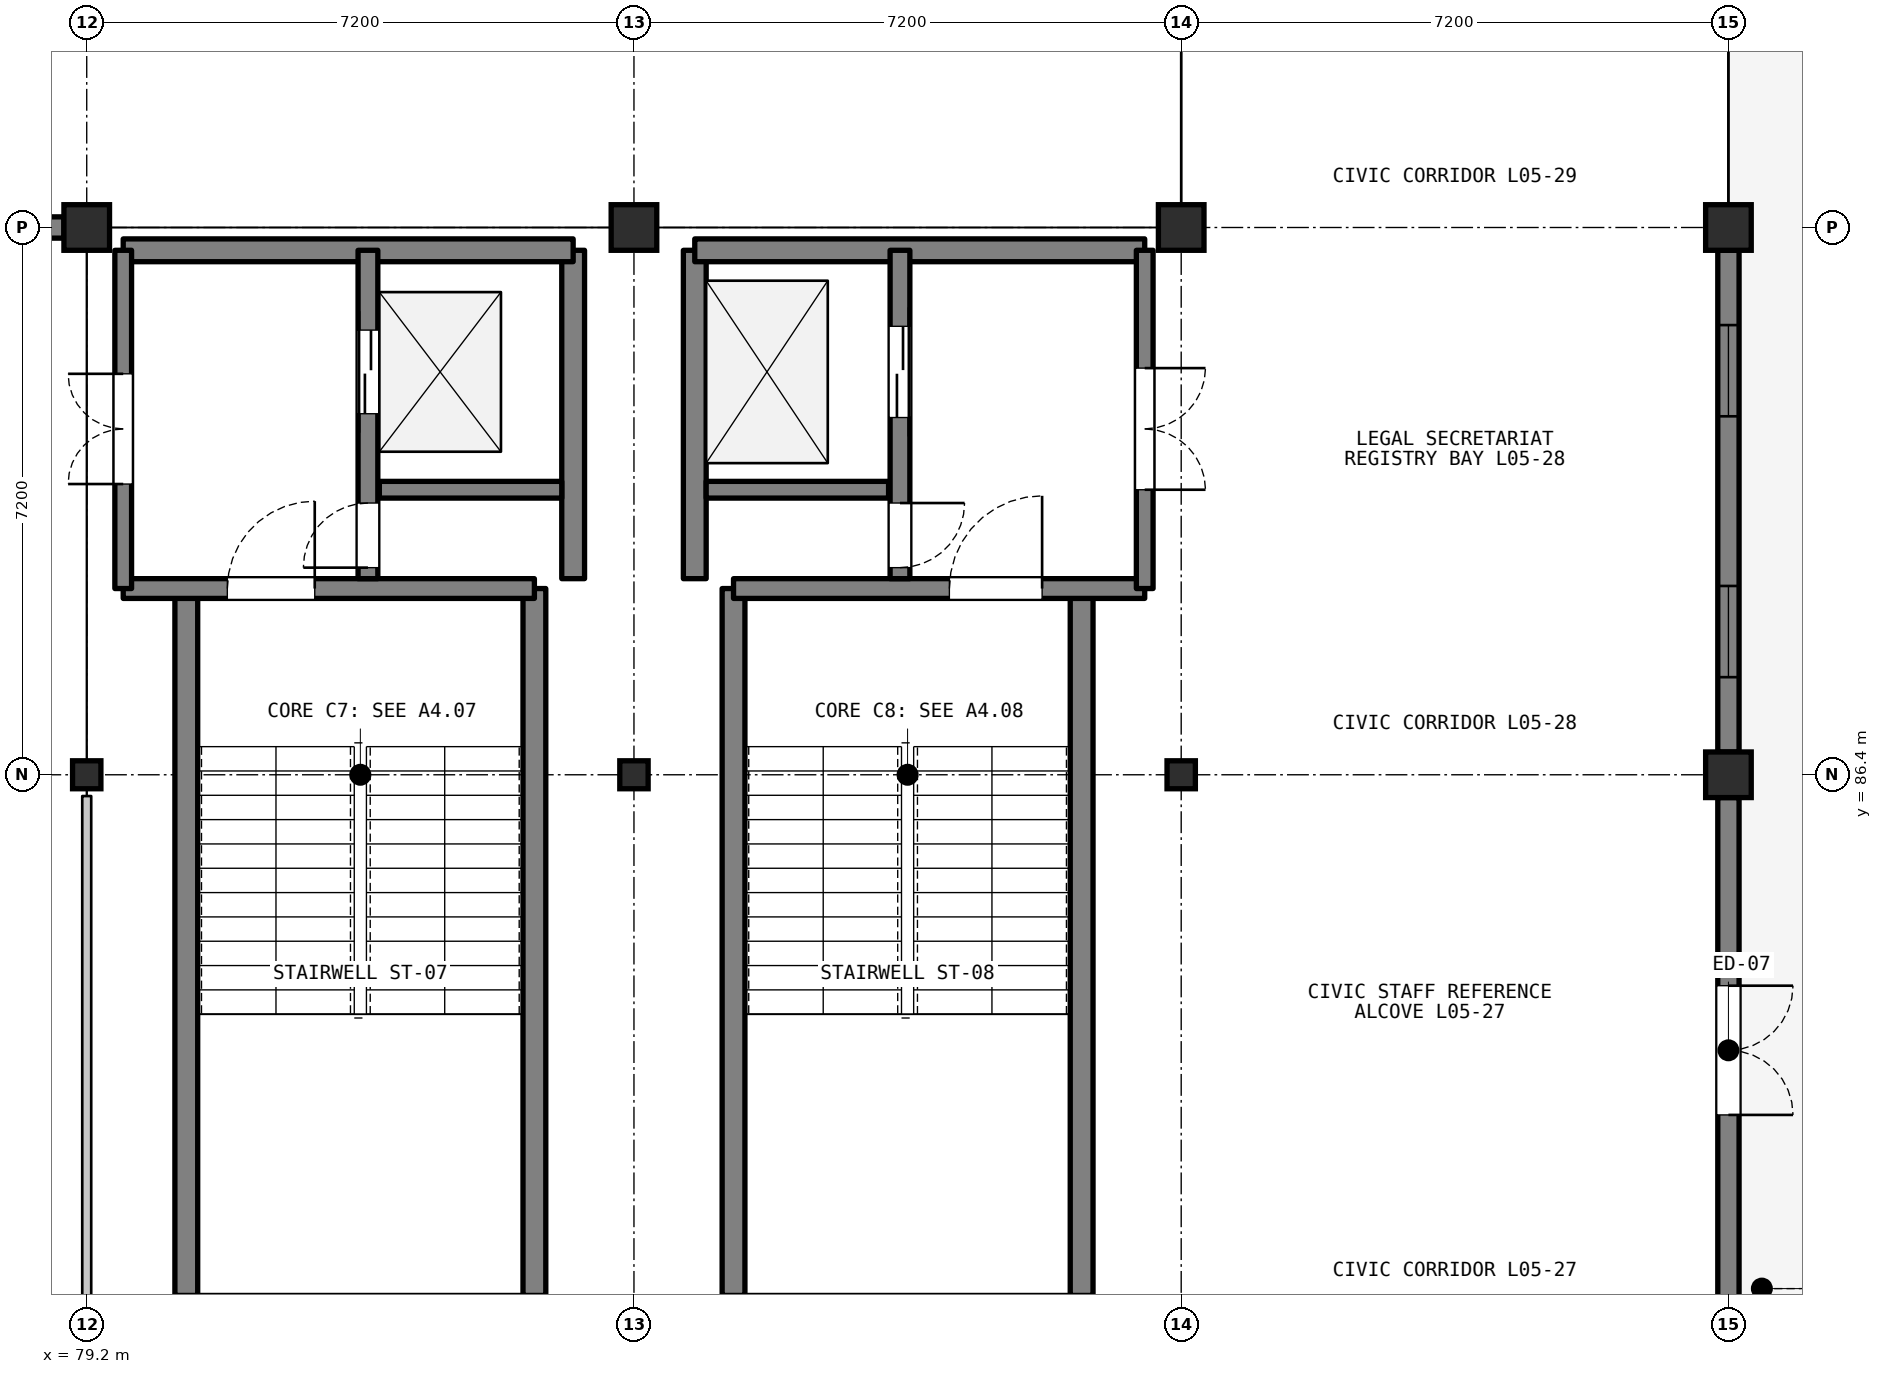
"""IFC4 building model, lengths in metres.
Left out: names, types, materials, properties, quantities, classifications, styles, units other than length and angle.
Written with IfcOpenShell. Run it as: python <this file> out.ifc"""

import sys

from ifc_helpers import new_model, si_unit, direction, frame, frame_2d, origin, origin_2d, place, context, subcontext, project, spatial, rectangle, i_section, extrude, element, fill, save


model = new_model("IFC4")
c1 = context("Model", 3, precision=1e-05, world=origin(), true_north=direction((0.0, 1.0)))
c2 = subcontext(c1, "Body", "Model", "MODEL_VIEW")
j1 = project(units=[si_unit("LENGTHUNIT", "METRE"), si_unit("PLANEANGLEUNIT", "RADIAN")], contexts=[c1])
p1 = place(None, origin())
s1 = spatial("IfcSite", under=j1, at=p1, CompositionType="ELEMENT")
p2 = place(p1, origin())
s2 = spatial("IfcBuilding", under=s1, at=p2, CompositionType="ELEMENT")
p3 = place(p2, frame((0.0, 0.0, 18.0)))
s3 = spatial("IfcBuildingStorey", under=s2, at=p3, CompositionType="ELEMENT", Elevation=18.0)
p4 = place(p3, frame((79.2, 86.4, 0.0), z_axis=(0.0, 0.0, 1.0), x_axis=(1.0, 0.0, 0.0)))
e1 = element("IfcColumn", 1, at=p4, inside=s3, PredefinedType="COLUMN", context=c2, shape_type="SweptSolid", body=[
    extrude(i_section(OverallWidth=0.373, OverallDepth=0.368, WebThickness=0.015, FlangeThickness=0.024, FilletRadius=0.015, at=origin_2d()), origin(), (0.0, 0.0, 1.0), 3.9),
])
p5 = place(p3, frame((79.2, 93.6, 0.0), z_axis=(0.0, 0.0, 1.0), x_axis=(1.0, 0.0, 0.0)))
e2 = element("IfcColumn", 2, at=p5, inside=s3, PredefinedType="COLUMN", context=c2, shape_type="SweptSolid", body=[
    extrude(rectangle(XDim=0.6, YDim=0.6, at=origin_2d()), origin(), (0.0, 0.0, 1.0), 3.9),
])
p6 = place(p3, frame((86.4, 86.4, 0.0), z_axis=(0.0, 0.0, 1.0), x_axis=(1.0, 0.0, 0.0)))
e3 = element("IfcColumn", 3, at=p6, inside=s3, PredefinedType="COLUMN", context=c2, shape_type="SweptSolid", body=[
    extrude(i_section(OverallWidth=0.373, OverallDepth=0.368, WebThickness=0.015, FlangeThickness=0.024, FilletRadius=0.015, at=origin_2d()), origin(), (0.0, 0.0, 1.0), 3.9),
])
p7 = place(p3, frame((86.4, 93.6, 0.0), z_axis=(0.0, 0.0, 1.0), x_axis=(1.0, 0.0, 0.0)))
e4 = element("IfcColumn", 4, at=p7, inside=s3, PredefinedType="COLUMN", context=c2, shape_type="SweptSolid", body=[
    extrude(rectangle(XDim=0.6, YDim=0.6, at=origin_2d()), origin(), (0.0, 0.0, 1.0), 3.9),
])
p8 = place(p3, frame((93.6, 86.4, 0.0), z_axis=(0.0, 0.0, 1.0), x_axis=(1.0, 0.0, 0.0)))
e5 = element("IfcColumn", 5, at=p8, inside=s3, PredefinedType="COLUMN", context=c2, shape_type="SweptSolid", body=[
    extrude(i_section(OverallWidth=0.373, OverallDepth=0.368, WebThickness=0.015, FlangeThickness=0.024, FilletRadius=0.015, at=origin_2d()), origin(), (0.0, 0.0, 1.0), 3.9),
])
for number, where, z_axis, x_axis in (
    (6, (93.6, 93.6, 0.0), (0.0, 0.0, 1.0), (1.0, 0.0, 0.0)),
    (7, (100.8, 86.4, 0.0), (0.0, 0.0, 1.0), (1.0, 0.0, 0.0)),
    (8, (100.8, 93.6, 0.0), (0.0, 0.0, 1.0), (1.0, 0.0, 0.0)),
):
    element("IfcColumn", number, at=place(p3, frame(where, z_axis=z_axis, x_axis=x_axis)), inside=s3, PredefinedType="COLUMN", context=c2, shape_type="SweptSolid", body=[
        extrude(rectangle(XDim=0.6, YDim=0.6, at=origin_2d()), origin(), (0.0, 0.0, 1.0), 3.9),
    ])
p9 = place(p3, frame((72.3, 93.6, 0.0), z_axis=(0.0, 0.0, 1.0), x_axis=(1.0, 0.0, 0.0)))
e9 = element("IfcWall", 9, at=p9, inside=s3, PredefinedType="SOLIDWALL", context=c2, shape_type="SweptSolid", body=[
    extrude(rectangle(XDim=6.6, YDim=0.28, at=frame_2d((3.3, 0.0))), origin(), (0.0, 0.0, 1.0), 3.192),
])
p10 = place(p3, frame((100.8, 86.1, 0.0), z_axis=(0.0, 0.0, 1.0), x_axis=(0.0, -1.0, 0.0)))
e10 = element("IfcWall", 10, at=p10, inside=s3, PredefinedType="SOLIDWALL", context=c2, shape_type="SweptSolid", body=[
    extrude(rectangle(XDim=6.65, YDim=0.28, at=frame_2d((3.325, 0.0))), origin(), (0.0, 0.0, 1.0), 3.172),
])
p11 = place(p10, frame((2.475, 0.0, 0.0)))
e11 = element("IfcOpeningElement", 11, at=p11, cuts=e10, PredefinedType="OPENING", context=c2, shape_type="SweptSolid", body=[
    extrude(rectangle(XDim=1.7, YDim=2.25, at=frame_2d((0.85, 1.125))), frame((0.0, 0.15, 0.0), z_axis=(0.0, -1.0, 0.0), x_axis=(1.0, 0.0, 0.0)), (0.0, 0.0, 1.0), 0.3),
])
p12 = place(p3, frame((100.8, 93.3, 0.0), z_axis=(0.0, 0.0, 1.0), x_axis=(0.0, -1.0, 0.0)))
e12 = element("IfcWall", 12, at=p12, inside=s3, PredefinedType="SOLIDWALL", context=c2, shape_type="SweptSolid", body=[
    extrude(rectangle(XDim=6.6, YDim=0.28, at=frame_2d((3.3, 0.0))), origin(), (0.0, 0.0, 1.0), 3.192),
])
p13 = place(p12, frame((0.984, 0.0, 0.95)))
e13 = element("IfcOpeningElement", 13, at=p13, cuts=e12, PredefinedType="OPENING", context=c2, shape_type="SweptSolid", body=[
    extrude(rectangle(XDim=1.2, YDim=1.7, at=frame_2d((0.6, 0.85))), frame((0.0, 0.15, 0.0), z_axis=(0.0, -1.0, 0.0), x_axis=(1.0, 0.0, 0.0)), (0.0, 0.0, 1.0), 0.3),
])
p14 = place(p12, frame((4.416, 0.0, 0.95)))
e14 = element("IfcOpeningElement", 14, at=p14, cuts=e12, PredefinedType="OPENING", context=c2, shape_type="SweptSolid", body=[
    extrude(rectangle(XDim=1.2, YDim=1.7, at=frame_2d((0.6, 0.85))), frame((0.0, 0.15, 0.0), z_axis=(0.0, -1.0, 0.0), x_axis=(1.0, 0.0, 0.0)), (0.0, 0.0, 1.0), 0.3),
])
for number, where, z_axis, x_axis in (
    (15, (80.51, 79.55, 0.0), (0.0, 0.0, 1.0), (0.0, 1.0, 0.0)),
    (16, (85.09, 79.55, 0.0), (0.0, 0.0, 1.0), (0.0, 1.0, 0.0)),
):
    element("IfcWall", number, at=place(p3, frame(where, z_axis=z_axis, x_axis=x_axis)), inside=s3, PredefinedType="SHEAR", context=c2, shape_type="SweptSolid", body=[
        extrude(rectangle(XDim=9.3, YDim=0.3, at=frame_2d((4.65, 0.0))), origin(), (0.0, 0.0, 1.0), 3.72),
    ])
p15 = place(p3, frame((79.68, 88.85, 0.0), z_axis=(0.0, 0.0, 1.0), x_axis=(1.0, 0.0, 0.0)))
e17 = element("IfcWall", 17, at=p15, inside=s3, PredefinedType="SHEAR", context=c2, shape_type="SweptSolid", body=[
    extrude(rectangle(XDim=5.41, YDim=0.26, at=frame_2d((2.705, 0.0))), origin(), (0.0, 0.0, 1.0), 3.72),
])
p16 = place(p15, frame((1.37, 0.0, 0.0)))
e18 = element("IfcOpeningElement", 18, at=p16, cuts=e17, PredefinedType="OPENING", context=c2, shape_type="SweptSolid", body=[
    extrude(rectangle(XDim=1.15, YDim=2.15, at=frame_2d((0.575, 1.075))), frame((0.0, 0.14, 0.0), z_axis=(0.0, -1.0, 0.0), x_axis=(1.0, 0.0, 0.0)), (0.0, 0.0, 1.0), 0.28),
])
p17 = place(p3, frame((85.6, 88.98, 0.0), z_axis=(0.0, 0.0, 1.0), x_axis=(0.0, 1.0, 0.0)))
e19 = element("IfcWall", 19, at=p17, inside=s3, PredefinedType="SHEAR", context=c2, shape_type="SweptSolid", body=[
    extrude(rectangle(XDim=4.32, YDim=0.3, at=frame_2d((2.16, 0.0))), origin(), (0.0, 0.0, 1.0), 3.72),
])
p18 = place(p3, frame((79.68, 93.3, 0.0), z_axis=(0.0, 0.0, 1.0), x_axis=(1.0, 0.0, 0.0)))
e20 = element("IfcWall", 20, at=p18, inside=s3, PredefinedType="SHEAR", context=c2, shape_type="SweptSolid", body=[
    extrude(rectangle(XDim=5.92, YDim=0.3, at=frame_2d((2.96, 0.0))), origin(), (0.0, 0.0, 1.0), 3.72),
])
p19 = place(p3, frame((83.05, 90.15, 0.0), z_axis=(0.0, 0.0, 1.0), x_axis=(1.0, 0.0, 0.0)))
e21 = element("IfcWall", 21, at=p19, inside=s3, PredefinedType="SHEAR", context=c2, shape_type="SweptSolid", body=[
    extrude(rectangle(XDim=2.4, YDim=0.22, at=frame_2d((1.2, 0.0))), origin(), (0.0, 0.0, 1.0), 3.72),
])
p20 = place(p3, frame((82.9, 88.98, 0.0), z_axis=(0.0, 0.0, 1.0), x_axis=(0.0, 1.0, 0.0)))
e22 = element("IfcWall", 22, at=p20, inside=s3, PredefinedType="SHEAR", context=c2, shape_type="SweptSolid", body=[
    extrude(rectangle(XDim=4.32, YDim=0.26, at=frame_2d((2.16, 0.0))), origin(), (0.0, 0.0, 1.0), 3.72),
])
p21 = place(p20, frame((2.17, 0.0, 0.0)))
e23 = element("IfcOpeningElement", 23, at=p21, cuts=e22, PredefinedType="OPENING", context=c2, shape_type="SweptSolid", body=[
    extrude(rectangle(XDim=1.1, YDim=2.15, at=frame_2d((0.55, 1.075))), frame((0.0, 0.14, 0.0), z_axis=(0.0, -1.0, 0.0), x_axis=(1.0, 0.0, 0.0)), (0.0, 0.0, 1.0), 0.28),
])
p22 = place(p20, frame((0.145, 0.0, 0.0)))
e24 = element("IfcOpeningElement", 24, at=p22, cuts=e22, PredefinedType="OPENING", context=c2, shape_type="SweptSolid", body=[
    extrude(rectangle(XDim=0.85, YDim=2.05, at=frame_2d((0.425, 1.025))), frame((0.0, 0.14, 0.0), z_axis=(0.0, -1.0, 0.0), x_axis=(1.0, 0.0, 0.0)), (0.0, 0.0, 1.0), 0.28),
])
p23 = place(p3, frame((79.68, 88.85, 0.0), z_axis=(0.0, 0.0, 1.0), x_axis=(0.0, 1.0, 0.0)))
e25 = element("IfcWall", 25, at=p23, inside=s3, PredefinedType="SHEAR", context=c2, shape_type="SweptSolid", body=[
    extrude(rectangle(XDim=4.45, YDim=0.22, at=frame_2d((2.225, 0.0))), origin(), (0.0, 0.0, 1.0), 3.72),
])
p24 = place(p23, frame((1.375, 0.0, 0.0)))
e26 = element("IfcOpeningElement", 26, at=p24, cuts=e25, PredefinedType="OPENING", context=c2, shape_type="SweptSolid", body=[
    extrude(rectangle(XDim=1.45, YDim=2.2, at=frame_2d((0.725, 1.1))), frame((0.0, 0.12, 0.0), z_axis=(0.0, -1.0, 0.0), x_axis=(1.0, 0.0, 0.0)), (0.0, 0.0, 1.0), 0.24),
])
for number, where, z_axis, x_axis in (
    (27, (87.71, 79.55, 0.0), (0.0, 0.0, 1.0), (0.0, 1.0, 0.0)),
    (28, (92.29, 79.55, 0.0), (0.0, 0.0, 1.0), (0.0, 1.0, 0.0)),
):
    element("IfcWall", number, at=place(p3, frame(where, z_axis=z_axis, x_axis=x_axis)), inside=s3, PredefinedType="SHEAR", context=c2, shape_type="SweptSolid", body=[
        extrude(rectangle(XDim=9.3, YDim=0.3, at=frame_2d((4.65, 0.0))), origin(), (0.0, 0.0, 1.0), 3.72),
    ])
p25 = place(p3, frame((87.71, 88.85, 0.0), z_axis=(0.0, 0.0, 1.0), x_axis=(1.0, 0.0, 0.0)))
e29 = element("IfcWall", 29, at=p25, inside=s3, PredefinedType="SHEAR", context=c2, shape_type="SweptSolid", body=[
    extrude(rectangle(XDim=5.41, YDim=0.26, at=frame_2d((2.705, 0.0))), origin(), (0.0, 0.0, 1.0), 3.72),
])
p26 = place(p25, frame((2.84, 0.0, 0.0)))
e30 = element("IfcOpeningElement", 30, at=p26, cuts=e29, PredefinedType="OPENING", context=c2, shape_type="SweptSolid", body=[
    extrude(rectangle(XDim=1.22, YDim=2.15, at=frame_2d((0.61, 1.075))), frame((0.0, 0.14, 0.0), z_axis=(0.0, -1.0, 0.0), x_axis=(1.0, 0.0, 0.0)), (0.0, 0.0, 1.0), 0.28),
])
p27 = place(p3, frame((87.2, 88.98, 0.0), z_axis=(0.0, 0.0, 1.0), x_axis=(0.0, 1.0, 0.0)))
e31 = element("IfcWall", 31, at=p27, inside=s3, PredefinedType="SHEAR", context=c2, shape_type="SweptSolid", body=[
    extrude(rectangle(XDim=4.32, YDim=0.3, at=frame_2d((2.16, 0.0))), origin(), (0.0, 0.0, 1.0), 3.72),
])
p28 = place(p3, frame((87.2, 93.3, 0.0), z_axis=(0.0, 0.0, 1.0), x_axis=(1.0, 0.0, 0.0)))
e32 = element("IfcWall", 32, at=p28, inside=s3, PredefinedType="SHEAR", context=c2, shape_type="SweptSolid", body=[
    extrude(rectangle(XDim=5.92, YDim=0.3, at=frame_2d((2.96, 0.0))), origin(), (0.0, 0.0, 1.0), 3.72),
])
p29 = place(p3, frame((87.35, 90.15, 0.0), z_axis=(0.0, 0.0, 1.0), x_axis=(1.0, 0.0, 0.0)))
e33 = element("IfcWall", 33, at=p29, inside=s3, PredefinedType="SHEAR", context=c2, shape_type="SweptSolid", body=[
    extrude(rectangle(XDim=2.4, YDim=0.22, at=frame_2d((1.2, 0.0))), origin(), (0.0, 0.0, 1.0), 3.72),
])
p30 = place(p3, frame((89.9, 93.3, 0.0), z_axis=(0.0, 0.0, 1.0), x_axis=(0.0, -1.0, 0.0)))
e34 = element("IfcWall", 34, at=p30, inside=s3, PredefinedType="SHEAR", context=c2, shape_type="SweptSolid", body=[
    extrude(rectangle(XDim=4.32, YDim=0.26, at=frame_2d((2.16, 0.0))), origin(), (0.0, 0.0, 1.0), 3.72),
])
p31 = place(p30, frame((1.0, 0.0, 0.0)))
e35 = element("IfcOpeningElement", 35, at=p31, cuts=e34, PredefinedType="OPENING", context=c2, shape_type="SweptSolid", body=[
    extrude(rectangle(XDim=1.2, YDim=2.15, at=frame_2d((0.6, 1.075))), frame((0.0, 0.14, 0.0), z_axis=(0.0, -1.0, 0.0), x_axis=(1.0, 0.0, 0.0)), (0.0, 0.0, 1.0), 0.28),
])
p32 = place(p30, frame((3.325, 0.0, 0.0)))
e36 = element("IfcOpeningElement", 36, at=p32, cuts=e34, PredefinedType="OPENING", context=c2, shape_type="SweptSolid", body=[
    extrude(rectangle(XDim=0.85, YDim=2.05, at=frame_2d((0.425, 1.025))), frame((0.0, 0.14, 0.0), z_axis=(0.0, -1.0, 0.0), x_axis=(1.0, 0.0, 0.0)), (0.0, 0.0, 1.0), 0.28),
])
p33 = place(p3, frame((93.12, 93.3, 0.0), z_axis=(0.0, 0.0, 1.0), x_axis=(0.0, -1.0, 0.0)))
e37 = element("IfcWall", 37, at=p33, inside=s3, PredefinedType="SHEAR", context=c2, shape_type="SweptSolid", body=[
    extrude(rectangle(XDim=4.45, YDim=0.22, at=frame_2d((2.225, 0.0))), origin(), (0.0, 0.0, 1.0), 3.72),
])
p34 = place(p33, frame((1.55, 0.0, 0.0)))
e38 = element("IfcOpeningElement", 38, at=p34, cuts=e37, PredefinedType="OPENING", context=c2, shape_type="SweptSolid", body=[
    extrude(rectangle(XDim=1.6, YDim=2.2, at=frame_2d((0.8, 1.1))), frame((0.0, 0.12, 0.0), z_axis=(0.0, -1.0, 0.0), x_axis=(1.0, 0.0, 0.0)), (0.0, 0.0, 1.0), 0.24),
])
p35 = place(p3, frame((79.2, 86.12, 0.0), z_axis=(0.0, 0.0, 1.0), x_axis=(0.0, -1.0, 0.0)))
e39 = element("IfcWall", 39, at=p35, inside=s3, PredefinedType="PARTITIONING", context=c2, shape_type="SweptSolid", body=[
    extrude(rectangle(XDim=6.64, YDim=0.118, at=frame_2d((3.32, 0.0))), origin(), (0.0, 0.0, 1.0), 3.177),
])
p36 = place(p11, origin())
e40 = element("IfcDoor", 40, at=p36, inside=s3, OperationType="DOUBLE_DOOR_SINGLE_SWING", PredefinedType="DOOR", context=c2, shape_type="SweptSolid", body=[
    extrude(rectangle(XDim=1.7, YDim=2.25, at=frame_2d((0.85, 1.125))), frame((0.0, 0.025, 0.0), z_axis=(0.0, -1.0, 0.0), x_axis=(1.0, 0.0, 0.0)), (0.0, 0.0, 1.0), 0.05),
])
fill(e11, e40)
p37 = place(p13, origin())
e41 = element("IfcWindow", 41, at=p37, inside=s3, PartitioningType="SINGLE_PANEL", PredefinedType="WINDOW", context=c2, shape_type="SweptSolid", body=[
    extrude(rectangle(XDim=1.2, YDim=1.7, at=frame_2d((0.6, 0.85))), frame((0.0, 0.03, 0.0), z_axis=(0.0, -1.0, 0.0), x_axis=(1.0, 0.0, 0.0)), (0.0, 0.0, 1.0), 0.06),
])
fill(e13, e41)
p38 = place(p14, origin())
e42 = element("IfcWindow", 42, at=p38, inside=s3, PartitioningType="SINGLE_PANEL", PredefinedType="WINDOW", context=c2, shape_type="SweptSolid", body=[
    extrude(rectangle(XDim=1.2, YDim=1.7, at=frame_2d((0.6, 0.85))), frame((0.0, 0.03, 0.0), z_axis=(0.0, -1.0, 0.0), x_axis=(1.0, 0.0, 0.0)), (0.0, 0.0, 1.0), 0.06),
])
fill(e14, e42)
p39 = place(p16, origin())
e43 = element("IfcDoor", 43, at=p39, inside=s3, OperationType="SINGLE_SWING_RIGHT", PredefinedType="DOOR", context=c2, shape_type="SweptSolid", body=[
    extrude(rectangle(XDim=1.15, YDim=2.15, at=frame_2d((0.575, 1.075))), frame((0.0, 0.025, 0.0), z_axis=(0.0, -1.0, 0.0), x_axis=(1.0, 0.0, 0.0)), (0.0, 0.0, 1.0), 0.05),
])
fill(e18, e43)
p40 = place(p21, origin())
e44 = element("IfcDoor", 44, at=p40, inside=s3, OperationType="DOUBLE_DOOR_SLIDING", PredefinedType="DOOR", context=c2, shape_type="SweptSolid", body=[
    extrude(rectangle(XDim=1.1, YDim=2.15, at=frame_2d((0.55, 1.075))), frame((0.0, 0.025, 0.0), z_axis=(0.0, -1.0, 0.0), x_axis=(1.0, 0.0, 0.0)), (0.0, 0.0, 1.0), 0.05),
])
fill(e23, e44)
p41 = place(p22, origin())
e45 = element("IfcDoor", 45, at=p41, inside=s3, OperationType="SINGLE_SWING_LEFT", PredefinedType="DOOR", context=c2, shape_type="SweptSolid", body=[
    extrude(rectangle(XDim=0.85, YDim=2.05, at=frame_2d((0.425, 1.025))), frame((0.0, 0.025, 0.0), z_axis=(0.0, -1.0, 0.0), x_axis=(1.0, 0.0, 0.0)), (0.0, 0.0, 1.0), 0.05),
])
fill(e24, e45)
p42 = place(p24, origin())
e46 = element("IfcDoor", 46, at=p42, inside=s3, OperationType="DOUBLE_DOOR_SINGLE_SWING", PredefinedType="DOOR", context=c2, shape_type="SweptSolid", body=[
    extrude(rectangle(XDim=1.45, YDim=2.2, at=frame_2d((0.725, 1.1))), frame((0.0, 0.025, 0.0), z_axis=(0.0, -1.0, 0.0), x_axis=(1.0, 0.0, 0.0)), (0.0, 0.0, 1.0), 0.05),
])
fill(e26, e46)
p43 = place(p26, origin())
e47 = element("IfcDoor", 47, at=p43, inside=s3, OperationType="SINGLE_SWING_RIGHT", PredefinedType="DOOR", context=c2, shape_type="SweptSolid", body=[
    extrude(rectangle(XDim=1.22, YDim=2.15, at=frame_2d((0.61, 1.075))), frame((0.0, 0.025, 0.0), z_axis=(0.0, -1.0, 0.0), x_axis=(1.0, 0.0, 0.0)), (0.0, 0.0, 1.0), 0.05),
])
fill(e30, e47)
p44 = place(p31, origin())
e48 = element("IfcDoor", 48, at=p44, inside=s3, OperationType="DOUBLE_DOOR_SLIDING", PredefinedType="DOOR", context=c2, shape_type="SweptSolid", body=[
    extrude(rectangle(XDim=1.2, YDim=2.15, at=frame_2d((0.6, 1.075))), frame((0.0, 0.025, 0.0), z_axis=(0.0, -1.0, 0.0), x_axis=(1.0, 0.0, 0.0)), (0.0, 0.0, 1.0), 0.05),
])
fill(e35, e48)
p45 = place(p32, origin())
e49 = element("IfcDoor", 49, at=p45, inside=s3, OperationType="SINGLE_SWING_LEFT", PredefinedType="DOOR", context=c2, shape_type="SweptSolid", body=[
    extrude(rectangle(XDim=0.85, YDim=2.05, at=frame_2d((0.425, 1.025))), frame((0.0, 0.025, 0.0), z_axis=(0.0, -1.0, 0.0), x_axis=(1.0, 0.0, 0.0)), (0.0, 0.0, 1.0), 0.05),
])
fill(e36, e49)
p46 = place(p34, origin())
e50 = element("IfcDoor", 50, at=p46, inside=s3, OperationType="DOUBLE_DOOR_SINGLE_SWING", PredefinedType="DOOR", context=c2, shape_type="SweptSolid", body=[
    extrude(rectangle(XDim=1.6, YDim=2.2, at=frame_2d((0.8, 1.1))), frame((0.0, 0.025, 0.0), z_axis=(0.0, -1.0, 0.0), x_axis=(1.0, 0.0, 0.0)), (0.0, 0.0, 1.0), 0.05),
])
fill(e38, e50)
save(model, sys.argv[1])
